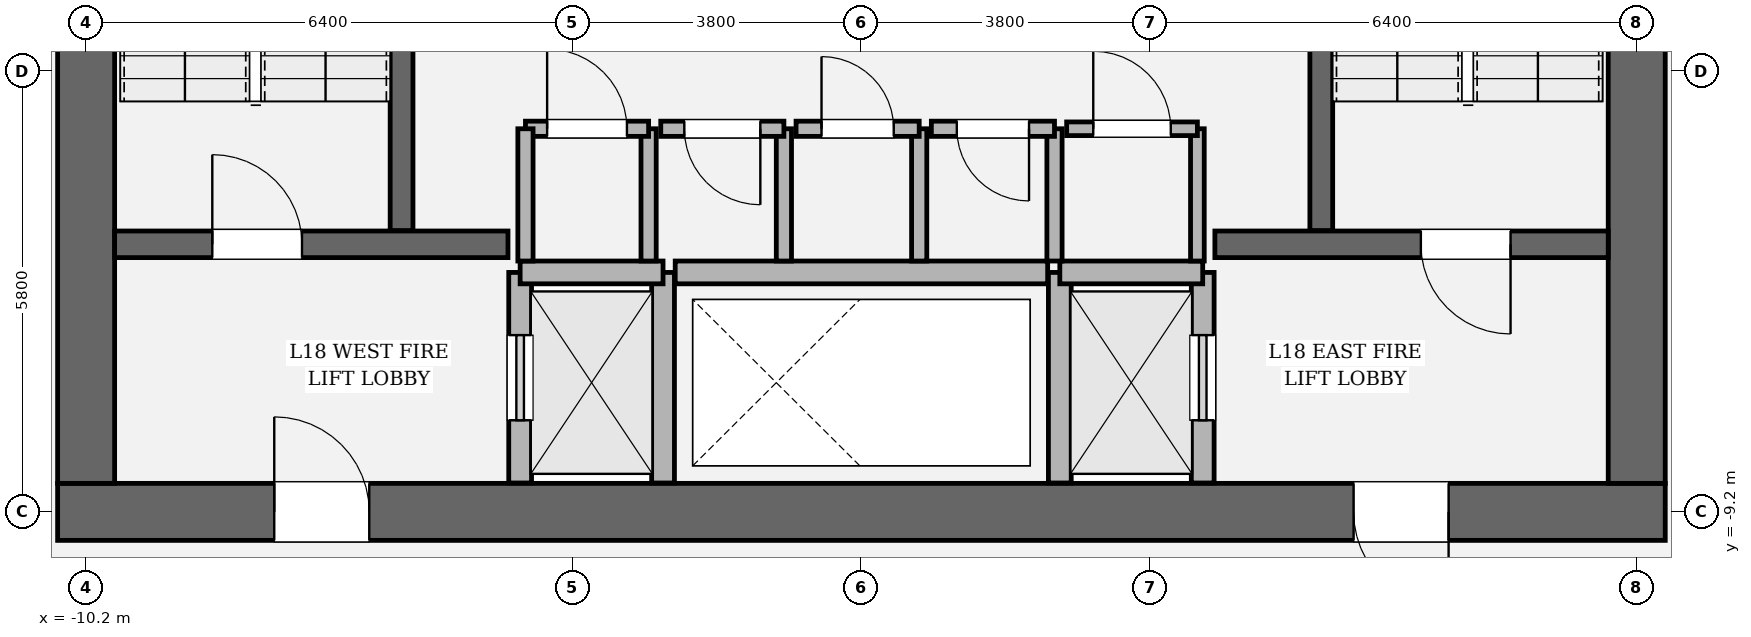
"""IFC4 building model, lengths in metres.
Left out: names, types, materials, properties, quantities, classifications, styles, units other than length and angle.
Written with IfcOpenShell. Run it as: python <this file> out.ifc"""

import sys

from ifc_helpers import new_model, si_unit, direction, frame, frame_2d, origin, place, context, subcontext, project, spatial, rectangle, extrude, element, fill, save


model = new_model("IFC4")
c1 = context("Model", 3, precision=1e-05, world=origin(), true_north=direction((0.0, 1.0)))
c2 = subcontext(c1, "Body", "Model", "MODEL_VIEW")
j1 = project(units=[si_unit("LENGTHUNIT", "METRE"), si_unit("PLANEANGLEUNIT", "RADIAN")], contexts=[c1])
p1 = place(None, origin())
s1 = spatial("IfcSite", under=j1, at=p1, CompositionType="ELEMENT")
p2 = place(p1, origin())
s2 = spatial("IfcBuilding", under=s1, at=p2, CompositionType="ELEMENT")
p3 = place(p2, frame((0.0, 0.0, 80.85)))
s3 = spatial("IfcBuildingStorey", under=s2, at=p3, CompositionType="ELEMENT", Elevation=80.85)
p4 = place(p3, frame((10.575, -9.2, 0.0), z_axis=(0.0, 0.0, 1.0), x_axis=(-1.0, 0.0, 0.0)))
e1 = element("IfcWall", 1, at=p4, inside=s3, PredefinedType="SHEAR", context=c2, shape_type="SweptSolid", body=[
    extrude(rectangle(XDim=21.15, YDim=0.75, at=frame_2d((10.575, 0.0))), origin(), (0.0, 0.0, 1.0), 4.05),
])
p5 = place(p4, frame((2.85, 0.0, 0.0)))
e2 = element("IfcOpeningElement", 2, at=p5, cuts=e1, PredefinedType="OPENING", context=c2, shape_type="SweptSolid", body=[
    extrude(rectangle(XDim=1.25, YDim=2.25, at=frame_2d((0.625, 1.125))), frame((0.0, 0.385, 0.0), z_axis=(0.0, -1.0, 0.0), x_axis=(1.0, 0.0, 0.0)), (0.0, 0.0, 1.0), 0.77),
])
p6 = place(p4, frame((17.05, 0.0, 0.0)))
e3 = element("IfcOpeningElement", 3, at=p6, cuts=e1, PredefinedType="OPENING", context=c2, shape_type="SweptSolid", body=[
    extrude(rectangle(XDim=1.25, YDim=2.25, at=frame_2d((0.625, 1.125))), frame((0.0, 0.385, 0.0), z_axis=(0.0, -1.0, 0.0), x_axis=(1.0, 0.0, 0.0)), (0.0, 0.0, 1.0), 0.77),
])
p7 = place(p3, frame((-10.2, -8.825, 0.0), z_axis=(0.0, 0.0, 1.0), x_axis=(0.0, 1.0, 0.0)))
e4 = element("IfcWall", 4, at=p7, inside=s3, PredefinedType="SHEAR", context=c2, shape_type="SweptSolid", body=[
    extrude(rectangle(XDim=17.65, YDim=0.75, at=frame_2d((8.825, 0.0))), origin(), (0.0, 0.0, 1.0), 4.05),
])
p8 = place(p7, frame((12.615, 0.0, 0.0)))
e5 = element("IfcOpeningElement", 5, at=p8, cuts=e4, PredefinedType="OPENING", context=c2, shape_type="SweptSolid", body=[
    extrude(rectangle(XDim=1.18, YDim=2.2, at=frame_2d((0.59, 1.1))), frame((0.0, 0.385, 0.0), z_axis=(0.0, -1.0, 0.0), x_axis=(1.0, 0.0, 0.0)), (0.0, 0.0, 1.0), 0.77),
])
p9 = place(p3, frame((10.2, 8.825, 0.0), z_axis=(0.0, 0.0, 1.0), x_axis=(0.0, -1.0, 0.0)))
e6 = element("IfcWall", 6, at=p9, inside=s3, PredefinedType="SHEAR", context=c2, shape_type="SweptSolid", body=[
    extrude(rectangle(XDim=17.65, YDim=0.75, at=frame_2d((8.825, 0.0))), origin(), (0.0, 0.0, 1.0), 4.05),
])
p10 = place(p9, frame((3.855, 0.0, 0.0)))
e7 = element("IfcOpeningElement", 7, at=p10, cuts=e6, PredefinedType="OPENING", context=c2, shape_type="SweptSolid", body=[
    extrude(rectangle(XDim=1.18, YDim=2.2, at=frame_2d((0.59, 1.1))), frame((0.0, 0.385, 0.0), z_axis=(0.0, -1.0, 0.0), x_axis=(1.0, 0.0, 0.0)), (0.0, 0.0, 1.0), 0.77),
])
for number, where, z_axis, x_axis in (
    (8, (-6.05, -5.5, 0.0), (0.0, 0.0, 1.0), (0.0, 1.0, 0.0)),
    (9, (6.05, 3.45, 0.0), (0.0, 0.0, 1.0), (0.0, -1.0, 0.0)),
):
    element("IfcWall", number, at=place(p3, frame(where, z_axis=z_axis, x_axis=x_axis)), inside=s3, PredefinedType="SOLIDWALL", context=c2, shape_type="SweptSolid", body=[
        extrude(rectangle(XDim=8.95, YDim=0.3, at=frame_2d((4.475, 0.0))), origin(), (0.0, 0.0, 1.0), 4.05),
    ])
p11 = place(p3, frame((-9.825, -5.68, 0.0), z_axis=(0.0, 0.0, 1.0), x_axis=(1.0, 0.0, 0.0)))
e10 = element("IfcWall", 10, at=p11, inside=s3, PredefinedType="SOLIDWALL", context=c2, shape_type="SweptSolid", body=[
    extrude(rectangle(XDim=5.175, YDim=0.35, at=frame_2d((2.587, 0.0))), origin(), (0.0, 0.0, 1.0), 4.05),
])
p12 = place(p11, frame((1.285, 0.0, 0.0)))
e11 = element("IfcOpeningElement", 11, at=p12, cuts=e10, PredefinedType="OPENING", context=c2, shape_type="SweptSolid", body=[
    extrude(rectangle(XDim=1.18, YDim=2.2, at=frame_2d((0.59, 1.1))), frame((0.0, 0.185, 0.0), z_axis=(0.0, -1.0, 0.0), x_axis=(1.0, 0.0, 0.0)), (0.0, 0.0, 1.0), 0.37),
])
p13 = place(p3, frame((4.65, -5.68, 0.0), z_axis=(0.0, 0.0, 1.0), x_axis=(1.0, 0.0, 0.0)))
e12 = element("IfcWall", 12, at=p13, inside=s3, PredefinedType="SOLIDWALL", context=c2, shape_type="SweptSolid", body=[
    extrude(rectangle(XDim=5.175, YDim=0.35, at=frame_2d((2.587, 0.0))), origin(), (0.0, 0.0, 1.0), 4.05),
])
p14 = place(p13, frame((2.71, 0.0, 0.0)))
e13 = element("IfcOpeningElement", 13, at=p14, cuts=e12, PredefinedType="OPENING", context=c2, shape_type="SweptSolid", body=[
    extrude(rectangle(XDim=1.18, YDim=2.2, at=frame_2d((0.59, 1.1))), frame((0.0, 0.185, 0.0), z_axis=(0.0, -1.0, 0.0), x_axis=(1.0, 0.0, 0.0)), (0.0, 0.0, 1.0), 0.37),
])
p15 = place(p3, frame((-4.49, -8.82, 0.0), z_axis=(0.0, 0.0, 1.0), x_axis=(0.0, 1.0, 0.0)))
e14 = element("IfcWall", 14, at=p15, inside=s3, PredefinedType="SOLIDWALL", context=c2, shape_type="SweptSolid", body=[
    extrude(rectangle(XDim=2.77, YDim=0.3, at=frame_2d((1.385, 0.0))), origin(), (0.0, 0.0, 1.0), 3.81),
])
p16 = place(p15, frame((0.825, 0.0, 0.0)))
e15 = element("IfcOpeningElement", 15, at=p16, cuts=e14, PredefinedType="OPENING", context=c2, shape_type="SweptSolid", body=[
    extrude(rectangle(XDim=1.12, YDim=2.25, at=frame_2d((0.56, 1.125))), frame((0.0, 0.16, 0.0), z_axis=(0.0, -1.0, 0.0), x_axis=(1.0, 0.0, 0.0)), (0.0, 0.0, 1.0), 0.32),
])
p17 = place(p3, frame((-2.61, -8.82, 0.0), z_axis=(0.0, 0.0, 1.0), x_axis=(0.0, 1.0, 0.0)))
e16 = element("IfcWall", 16, at=p17, inside=s3, PredefinedType="SOLIDWALL", context=c2, shape_type="SweptSolid", body=[
    extrude(rectangle(XDim=2.77, YDim=0.3, at=frame_2d((1.385, 0.0))), origin(), (0.0, 0.0, 1.0), 3.81),
])
p18 = place(p3, frame((-4.49, -6.05, 0.0), z_axis=(0.0, 0.0, 1.0), x_axis=(1.0, 0.0, 0.0)))
e17 = element("IfcWall", 17, at=p18, inside=s3, PredefinedType="SOLIDWALL", context=c2, shape_type="SweptSolid", body=[
    extrude(rectangle(XDim=1.88, YDim=0.3, at=frame_2d((0.94, 0.0))), origin(), (0.0, 0.0, 1.0), 3.81),
])
p19 = place(p3, frame((4.49, -8.82, 0.0), z_axis=(0.0, 0.0, 1.0), x_axis=(0.0, 1.0, 0.0)))
e18 = element("IfcWall", 18, at=p19, inside=s3, PredefinedType="SOLIDWALL", context=c2, shape_type="SweptSolid", body=[
    extrude(rectangle(XDim=2.77, YDim=0.3, at=frame_2d((1.385, 0.0))), origin(), (0.0, 0.0, 1.0), 3.81),
])
p20 = place(p19, frame((0.825, 0.0, 0.0)))
e19 = element("IfcOpeningElement", 19, at=p20, cuts=e18, PredefinedType="OPENING", context=c2, shape_type="SweptSolid", body=[
    extrude(rectangle(XDim=1.12, YDim=2.25, at=frame_2d((0.56, 1.125))), frame((0.0, 0.16, 0.0), z_axis=(0.0, -1.0, 0.0), x_axis=(1.0, 0.0, 0.0)), (0.0, 0.0, 1.0), 0.32),
])
p21 = place(p3, frame((2.61, -8.82, 0.0), z_axis=(0.0, 0.0, 1.0), x_axis=(0.0, 1.0, 0.0)))
e20 = element("IfcWall", 20, at=p21, inside=s3, PredefinedType="SOLIDWALL", context=c2, shape_type="SweptSolid", body=[
    extrude(rectangle(XDim=2.77, YDim=0.3, at=frame_2d((1.385, 0.0))), origin(), (0.0, 0.0, 1.0), 3.81),
])
p22 = place(p3, frame((2.61, -6.05, 0.0), z_axis=(0.0, 0.0, 1.0), x_axis=(1.0, 0.0, 0.0)))
e21 = element("IfcWall", 21, at=p22, inside=s3, PredefinedType="SOLIDWALL", context=c2, shape_type="SweptSolid", body=[
    extrude(rectangle(XDim=1.88, YDim=0.3, at=frame_2d((0.94, 0.0))), origin(), (0.0, 0.0, 1.0), 3.81),
])
p23 = place(p3, frame((-2.45, -6.05, 0.0), z_axis=(0.0, 0.0, 1.0), x_axis=(1.0, 0.0, 0.0)))
e22 = element("IfcWall", 22, at=p23, inside=s3, PredefinedType="SOLIDWALL", context=c2, shape_type="SweptSolid", body=[
    extrude(rectangle(XDim=4.9, YDim=0.3, at=frame_2d((2.45, 0.0))), origin(), (0.0, 0.0, 1.0), 3.81),
])
p24 = place(p3, frame((-2.8, -5.9, 0.0), z_axis=(0.0, 0.0, 1.0), x_axis=(0.0, 1.0, 0.0)))
e23 = element("IfcWall", 23, at=p24, inside=s3, PredefinedType="SOLIDWALL", context=c2, shape_type="SweptSolid", body=[
    extrude(rectangle(XDim=1.74, YDim=0.2, at=frame_2d((0.87, 0.0))), origin(), (0.0, 0.0, 1.0), 3.81),
])
p25 = place(p3, frame((-2.8, -4.16, 0.0), z_axis=(0.0, 0.0, 1.0), x_axis=(-1.0, 0.0, 0.0)))
e24 = element("IfcWall", 24, at=p25, inside=s3, PredefinedType="SOLIDWALL", context=c2, shape_type="SweptSolid", body=[
    extrude(rectangle(XDim=1.62, YDim=0.2, at=frame_2d((0.81, 0.0))), origin(), (0.0, 0.0, 1.0), 3.81),
])
p26 = place(p25, frame((0.285, 0.0, 0.0)))
e25 = element("IfcOpeningElement", 25, at=p26, cuts=e24, PredefinedType="OPENING", context=c2, shape_type="SweptSolid", body=[
    extrude(rectangle(XDim=1.05, YDim=2.2, at=frame_2d((0.525, 1.1))), frame((0.0, 0.11, 0.0), z_axis=(0.0, -1.0, 0.0), x_axis=(1.0, 0.0, 0.0)), (0.0, 0.0, 1.0), 0.22),
])
for number, where, z_axis, x_axis in (
    (26, (-4.42, -4.16, 0.0), (0.0, 0.0, 1.0), (0.0, -1.0, 0.0)),
    (27, (-1.02, -5.9, 0.0), (0.0, 0.0, 1.0), (0.0, 1.0, 0.0)),
):
    element("IfcWall", number, at=place(p3, frame(where, z_axis=z_axis, x_axis=x_axis)), inside=s3, PredefinedType="SOLIDWALL", context=c2, shape_type="SweptSolid", body=[
        extrude(rectangle(XDim=1.74, YDim=0.2, at=frame_2d((0.87, 0.0))), origin(), (0.0, 0.0, 1.0), 3.81),
    ])
p27 = place(p3, frame((-1.02, -4.16, 0.0), z_axis=(0.0, 0.0, 1.0), x_axis=(-1.0, 0.0, 0.0)))
e28 = element("IfcWall", 28, at=p27, inside=s3, PredefinedType="SOLIDWALL", context=c2, shape_type="SweptSolid", body=[
    extrude(rectangle(XDim=1.62, YDim=0.2, at=frame_2d((0.81, 0.0))), origin(), (0.0, 0.0, 1.0), 3.81),
])
p28 = place(p27, frame((0.31, 0.0, 0.0)))
e29 = element("IfcOpeningElement", 29, at=p28, cuts=e28, PredefinedType="OPENING", context=c2, shape_type="SweptSolid", body=[
    extrude(rectangle(XDim=1.0, YDim=2.15, at=frame_2d((0.5, 1.075))), frame((0.0, 0.11, 0.0), z_axis=(0.0, -1.0, 0.0), x_axis=(1.0, 0.0, 0.0)), (0.0, 0.0, 1.0), 0.22),
])
p29 = place(p3, frame((0.76, -5.9, 0.0), z_axis=(0.0, 0.0, 1.0), x_axis=(0.0, 1.0, 0.0)))
e30 = element("IfcWall", 30, at=p29, inside=s3, PredefinedType="SOLIDWALL", context=c2, shape_type="SweptSolid", body=[
    extrude(rectangle(XDim=1.74, YDim=0.2, at=frame_2d((0.87, 0.0))), origin(), (0.0, 0.0, 1.0), 3.81),
])
p30 = place(p3, frame((0.76, -4.16, 0.0), z_axis=(0.0, 0.0, 1.0), x_axis=(-1.0, 0.0, 0.0)))
e31 = element("IfcWall", 31, at=p30, inside=s3, PredefinedType="SOLIDWALL", context=c2, shape_type="SweptSolid", body=[
    extrude(rectangle(XDim=1.62, YDim=0.2, at=frame_2d((0.81, 0.0))), origin(), (0.0, 0.0, 1.0), 3.81),
])
p31 = place(p30, frame((0.335, 0.0, 0.0)))
e32 = element("IfcOpeningElement", 32, at=p31, cuts=e31, PredefinedType="OPENING", context=c2, shape_type="SweptSolid", body=[
    extrude(rectangle(XDim=0.95, YDim=2.15, at=frame_2d((0.475, 1.075))), frame((0.0, 0.11, 0.0), z_axis=(0.0, -1.0, 0.0), x_axis=(1.0, 0.0, 0.0)), (0.0, 0.0, 1.0), 0.22),
])
p32 = place(p3, frame((2.54, -5.9, 0.0), z_axis=(0.0, 0.0, 1.0), x_axis=(0.0, 1.0, 0.0)))
e33 = element("IfcWall", 33, at=p32, inside=s3, PredefinedType="SOLIDWALL", context=c2, shape_type="SweptSolid", body=[
    extrude(rectangle(XDim=1.74, YDim=0.2, at=frame_2d((0.87, 0.0))), origin(), (0.0, 0.0, 1.0), 3.81),
])
p33 = place(p3, frame((2.54, -4.16, 0.0), z_axis=(0.0, 0.0, 1.0), x_axis=(-1.0, 0.0, 0.0)))
e34 = element("IfcWall", 34, at=p33, inside=s3, PredefinedType="SOLIDWALL", context=c2, shape_type="SweptSolid", body=[
    extrude(rectangle(XDim=1.62, YDim=0.2, at=frame_2d((0.81, 0.0))), origin(), (0.0, 0.0, 1.0), 3.81),
])
p34 = place(p33, frame((0.335, 0.0, 0.0)))
e35 = element("IfcOpeningElement", 35, at=p34, cuts=e34, PredefinedType="OPENING", context=c2, shape_type="SweptSolid", body=[
    extrude(rectangle(XDim=0.95, YDim=2.15, at=frame_2d((0.475, 1.075))), frame((0.0, 0.11, 0.0), z_axis=(0.0, -1.0, 0.0), x_axis=(1.0, 0.0, 0.0)), (0.0, 0.0, 1.0), 0.22),
])
p35 = place(p3, frame((4.42, -5.9, 0.0), z_axis=(0.0, 0.0, 1.0), x_axis=(0.0, 1.0, 0.0)))
e36 = element("IfcWall", 36, at=p35, inside=s3, PredefinedType="PARTITIONING", context=c2, shape_type="SweptSolid", body=[
    extrude(rectangle(XDim=1.74, YDim=0.18, at=frame_2d((0.87, 0.0))), origin(), (0.0, 0.0, 1.0), 3.81),
])
p36 = place(p3, frame((4.42, -4.16, 0.0), z_axis=(0.0, 0.0, 1.0), x_axis=(-1.0, 0.0, 0.0)))
e37 = element("IfcWall", 37, at=p36, inside=s3, PredefinedType="PARTITIONING", context=c2, shape_type="SweptSolid", body=[
    extrude(rectangle(XDim=1.72, YDim=0.18, at=frame_2d((0.86, 0.0))), origin(), (0.0, 0.0, 1.0), 3.81),
])
p37 = place(p36, frame((0.35, 0.0, 0.0)))
e38 = element("IfcOpeningElement", 38, at=p37, cuts=e37, PredefinedType="OPENING", context=c2, shape_type="SweptSolid", body=[
    extrude(rectangle(XDim=1.02, YDim=2.2, at=frame_2d((0.51, 1.1))), frame((0.0, 0.1, 0.0), z_axis=(0.0, -1.0, 0.0), x_axis=(1.0, 0.0, 0.0)), (0.0, 0.0, 1.0), 0.2),
])
p38 = place(p12, origin())
e39 = element("IfcDoor", 39, at=p38, inside=s3, OperationType="SINGLE_SWING_LEFT", PredefinedType="DOOR", context=c2, shape_type="SweptSolid", body=[
    extrude(rectangle(XDim=1.18, YDim=2.2, at=frame_2d((0.59, 1.1))), frame((0.0, 0.025, 0.0), z_axis=(0.0, -1.0, 0.0), x_axis=(1.0, 0.0, 0.0)), (0.0, 0.0, 1.0), 0.05),
])
fill(e11, e39)
p39 = place(p14, origin())
e40 = element("IfcDoor", 40, at=p39, inside=s3, OperationType="SINGLE_SWING_RIGHT", PredefinedType="DOOR", context=c2, shape_type="SweptSolid", body=[
    extrude(rectangle(XDim=1.18, YDim=2.2, at=frame_2d((0.59, 1.1))), frame((0.0, 0.025, 0.0), z_axis=(0.0, -1.0, 0.0), x_axis=(1.0, 0.0, 0.0)), (0.0, 0.0, 1.0), 0.05),
])
fill(e13, e40)
p40 = place(p5, origin())
e41 = element("IfcDoor", 41, at=p40, inside=s3, OperationType="SINGLE_SWING_LEFT", PredefinedType="DOOR", context=c2, shape_type="SweptSolid", body=[
    extrude(rectangle(XDim=1.25, YDim=2.25, at=frame_2d((0.625, 1.125))), frame((0.0, 0.025, 0.0), z_axis=(0.0, -1.0, 0.0), x_axis=(1.0, 0.0, 0.0)), (0.0, 0.0, 1.0), 0.05),
])
fill(e2, e41)
p41 = place(p6, origin())
e42 = element("IfcDoor", 42, at=p41, inside=s3, OperationType="SINGLE_SWING_RIGHT", PredefinedType="DOOR", context=c2, shape_type="SweptSolid", body=[
    extrude(rectangle(XDim=1.25, YDim=2.25, at=frame_2d((0.625, 1.125))), frame((0.0, 0.025, 0.0), z_axis=(0.0, -1.0, 0.0), x_axis=(1.0, 0.0, 0.0)), (0.0, 0.0, 1.0), 0.05),
])
fill(e3, e42)
p42 = place(p16, origin())
e43 = element("IfcDoor", 43, at=p42, inside=s3, OperationType="SLIDING_TO_LEFT", PredefinedType="DOOR", context=c2, shape_type="SweptSolid", body=[
    extrude(rectangle(XDim=1.12, YDim=2.25, at=frame_2d((0.56, 1.125))), frame((0.0, 0.025, 0.0), z_axis=(0.0, -1.0, 0.0), x_axis=(1.0, 0.0, 0.0)), (0.0, 0.0, 1.0), 0.05),
])
fill(e15, e43)
p43 = place(p20, origin())
e44 = element("IfcDoor", 44, at=p43, inside=s3, OperationType="SLIDING_TO_RIGHT", PredefinedType="DOOR", context=c2, shape_type="SweptSolid", body=[
    extrude(rectangle(XDim=1.12, YDim=2.25, at=frame_2d((0.56, 1.125))), frame((0.0, 0.025, 0.0), z_axis=(0.0, -1.0, 0.0), x_axis=(1.0, 0.0, 0.0)), (0.0, 0.0, 1.0), 0.05),
])
fill(e19, e44)
p44 = place(p26, origin())
e45 = element("IfcDoor", 45, at=p44, inside=s3, OperationType="SINGLE_SWING_RIGHT", PredefinedType="DOOR", context=c2, shape_type="SweptSolid", body=[
    extrude(rectangle(XDim=1.05, YDim=2.2, at=frame_2d((0.525, 1.1))), frame((0.0, 0.025, 0.0), z_axis=(0.0, -1.0, 0.0), x_axis=(1.0, 0.0, 0.0)), (0.0, 0.0, 1.0), 0.05),
])
fill(e25, e45)
p45 = place(p28, origin())
e46 = element("IfcDoor", 46, at=p45, inside=s3, OperationType="SINGLE_SWING_LEFT", PredefinedType="DOOR", context=c2, shape_type="SweptSolid", body=[
    extrude(rectangle(XDim=1.0, YDim=2.15, at=frame_2d((0.5, 1.075))), frame((0.0, 0.025, 0.0), z_axis=(0.0, -1.0, 0.0), x_axis=(1.0, 0.0, 0.0)), (0.0, 0.0, 1.0), 0.05),
])
fill(e29, e46)
p46 = place(p31, origin())
e47 = element("IfcDoor", 47, at=p46, inside=s3, OperationType="SINGLE_SWING_RIGHT", PredefinedType="DOOR", context=c2, shape_type="SweptSolid", body=[
    extrude(rectangle(XDim=0.95, YDim=2.15, at=frame_2d((0.475, 1.075))), frame((0.0, 0.025, 0.0), z_axis=(0.0, -1.0, 0.0), x_axis=(1.0, 0.0, 0.0)), (0.0, 0.0, 1.0), 0.05),
])
fill(e32, e47)
p47 = place(p34, origin())
e48 = element("IfcDoor", 48, at=p47, inside=s3, OperationType="SINGLE_SWING_LEFT", PredefinedType="DOOR", context=c2, shape_type="SweptSolid", body=[
    extrude(rectangle(XDim=0.95, YDim=2.15, at=frame_2d((0.475, 1.075))), frame((0.0, 0.025, 0.0), z_axis=(0.0, -1.0, 0.0), x_axis=(1.0, 0.0, 0.0)), (0.0, 0.0, 1.0), 0.05),
])
fill(e35, e48)
p48 = place(p37, origin())
e49 = element("IfcDoor", 49, at=p48, inside=s3, OperationType="SINGLE_SWING_RIGHT", PredefinedType="DOOR", context=c2, shape_type="SweptSolid", body=[
    extrude(rectangle(XDim=1.02, YDim=2.2, at=frame_2d((0.51, 1.1))), frame((0.0, 0.025, 0.0), z_axis=(0.0, -1.0, 0.0), x_axis=(1.0, 0.0, 0.0)), (0.0, 0.0, 1.0), 0.05),
])
fill(e38, e49)
save(model, sys.argv[1])
